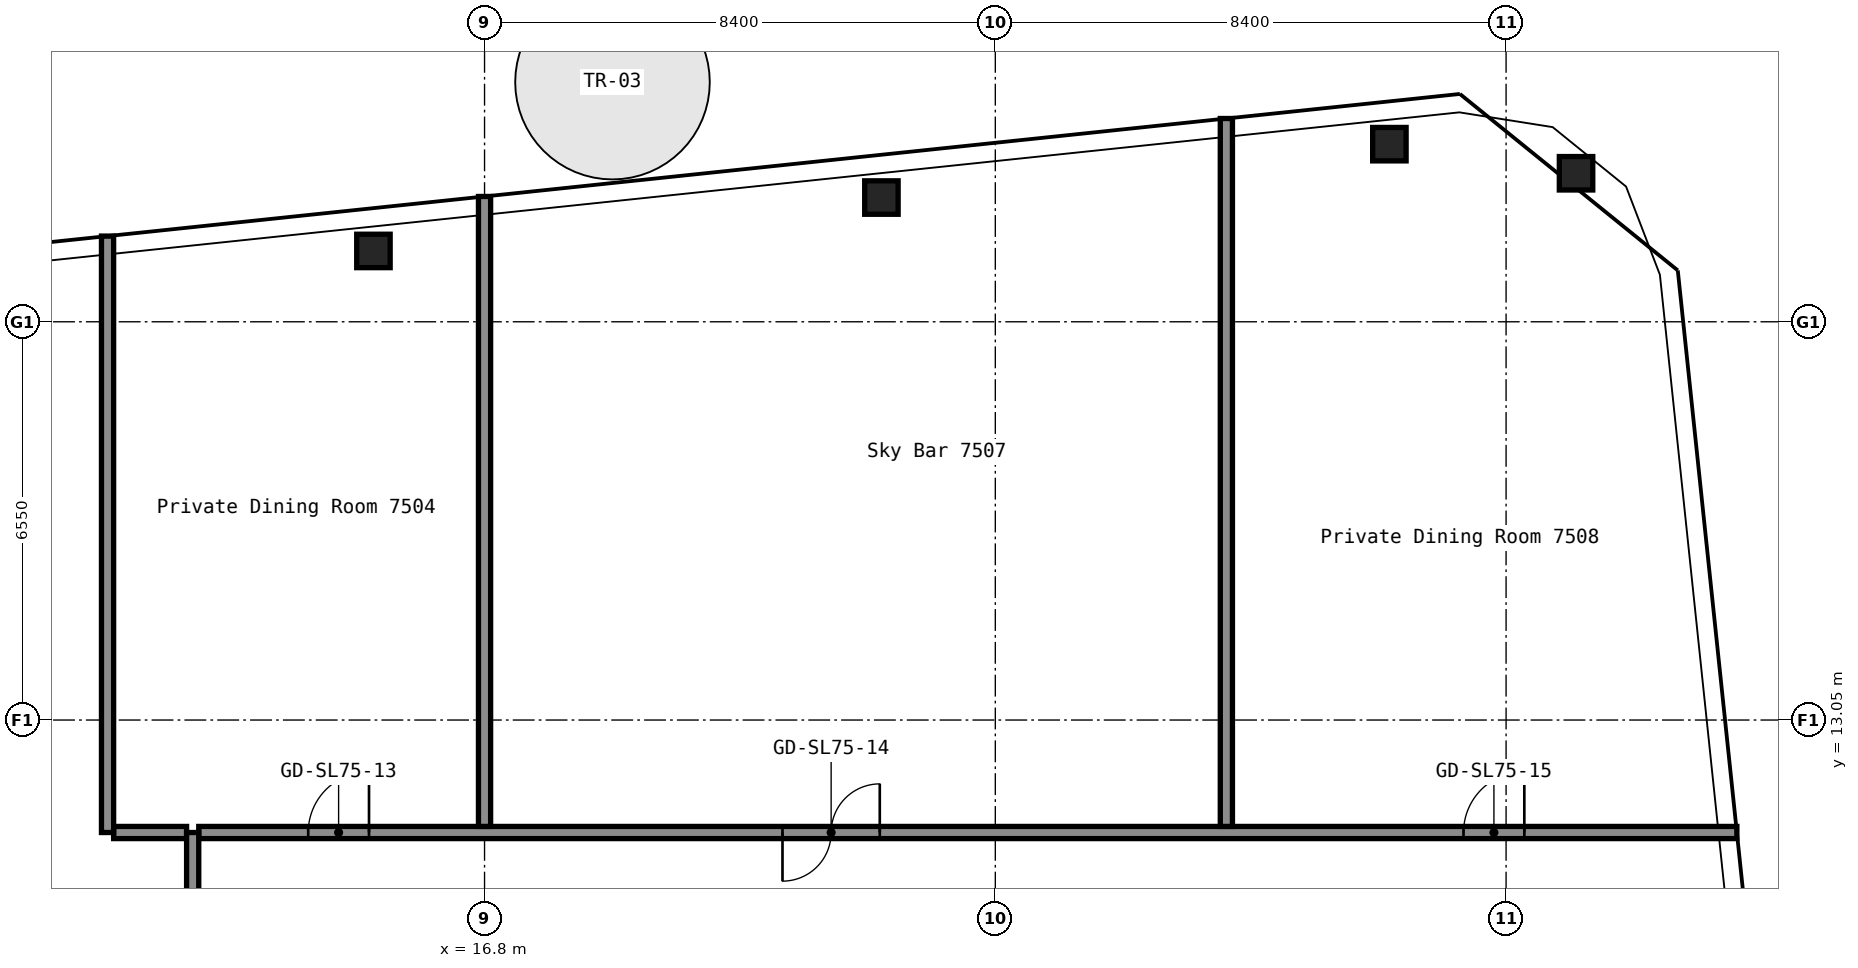
"""IFC4 building model, lengths in metres.
Left out: names, types, materials, properties, quantities, classifications, styles, units other than length and angle.
Written with IfcOpenShell. Run it as: python <this file> out.ifc"""

import sys

from ifc_helpers import new_model, si_unit, direction, frame, frame_2d, origin, origin_2d, place, context, subcontext, project, spatial, rectangle, hollow_rectangle, extrude, element, fill, save


model = new_model("IFC4")
c1 = context("Model", 3, precision=1e-05, world=origin(), true_north=direction((0.0, 1.0)))
c2 = subcontext(c1, "Body", "Model", "MODEL_VIEW")
j1 = project(units=[si_unit("LENGTHUNIT", "METRE"), si_unit("PLANEANGLEUNIT", "RADIAN")], contexts=[c1])
p1 = place(None, origin())
s1 = spatial("IfcSite", under=j1, at=p1, CompositionType="ELEMENT")
p2 = place(p1, origin())
s2 = spatial("IfcBuilding", under=s1, at=p2, CompositionType="ELEMENT")
p3 = place(p2, frame((0.0, 0.0, 264.6)))
s3 = spatial("IfcBuildingStorey", under=s2, at=p3, CompositionType="ELEMENT", Elevation=264.6)
for number, where, z_axis, x_axis in (
    (1, (14.973, 20.765, 0.0), (0.0, 0.0, 1.0), (1.0, 0.0, 0.0)),
    (2, (23.327, 21.643, 0.0), (0.0, 0.0, 1.0), (1.0, 0.0, 0.0)),
    (3, (31.681, 22.521, 0.0), (0.0, 0.0, 1.0), (1.0, 0.0, 0.0)),
    (4, (34.751, 22.042, 0.0), (0.0, 0.0, 1.0), (1.0, 0.0, 0.0)),
):
    element("IfcColumn", number, at=place(p3, frame(where, z_axis=z_axis, x_axis=x_axis)), inside=s3, PredefinedType="COLUMN", context=c2, shape_type="SweptSolid", body=[
        extrude(hollow_rectangle(XDim=0.55, YDim=0.55, WallThickness=0.022, InnerFilletRadius=0.033, OuterFilletRadius=0.055, at=origin_2d()), origin(), (0.0, 0.0, 1.0), 5.55),
    ])
p4 = place(p3, frame((10.7, 11.2, 0.0), z_axis=(0.0, 0.0, 1.0), x_axis=(1.0, 0.0, 0.0)))
e5 = element("IfcWall", 5, at=p4, inside=s3, PredefinedType="PARTITIONING", context=c2, shape_type="SweptSolid", body=[
    extrude(rectangle(XDim=1.2, YDim=0.2, at=frame_2d((0.6, 0.0))), origin(), (0.0, 0.0, 1.0), 5.55),
])
p5 = place(p3, frame((12.1, 11.2, 0.0), z_axis=(0.0, 0.0, 1.0), x_axis=(1.0, 0.0, 0.0)))
e6 = element("IfcWall", 6, at=p5, inside=s3, PredefinedType="PARTITIONING", context=c2, shape_type="SweptSolid", body=[
    extrude(rectangle(XDim=25.295, YDim=0.2, at=frame_2d((12.648, 0.0))), origin(), (0.0, 0.0, 1.0), 5.55),
])
p6 = place(p5, frame((1.8, 0.0, 0.0)))
e7 = element("IfcOpeningElement", 7, at=p6, cuts=e6, PredefinedType="OPENING", context=c2, shape_type="SweptSolid", body=[
    extrude(rectangle(XDim=1.0, YDim=2.1, at=frame_2d((0.5, 1.05))), frame((0.0, 0.11, 0.0), z_axis=(0.0, -1.0, 0.0), x_axis=(1.0, 0.0, 0.0)), (0.0, 0.0, 1.0), 0.22),
])
p7 = place(p5, frame((9.6, 0.0, 0.0)))
e8 = element("IfcOpeningElement", 8, at=p7, cuts=e6, PredefinedType="OPENING", context=c2, shape_type="SweptSolid", body=[
    extrude(rectangle(XDim=1.6, YDim=2.1, at=frame_2d((0.8, 1.05))), frame((0.0, 0.11, 0.0), z_axis=(0.0, -1.0, 0.0), x_axis=(1.0, 0.0, 0.0)), (0.0, 0.0, 1.0), 0.22),
])
p8 = place(p5, frame((20.8, 0.0, 0.0)))
e9 = element("IfcOpeningElement", 9, at=p8, cuts=e6, PredefinedType="OPENING", context=c2, shape_type="SweptSolid", body=[
    extrude(rectangle(XDim=1.0, YDim=2.1, at=frame_2d((0.5, 1.05))), frame((0.0, 0.11, 0.0), z_axis=(0.0, -1.0, 0.0), x_axis=(1.0, 0.0, 0.0)), (0.0, 0.0, 1.0), 0.22),
])
p9 = place(p3, frame((10.6, 11.2, 0.0), z_axis=(0.0, 0.0, 1.0), x_axis=(0.0, 1.0, 0.0)))
e10 = element("IfcWall", 10, at=p9, inside=s3, PredefinedType="PARTITIONING", context=c2, shape_type="SweptSolid", body=[
    extrude(rectangle(XDim=9.81, YDim=0.2, at=frame_2d((4.905, 0.0))), origin(), (0.0, 0.0, 1.0), 5.55),
])
p10 = place(p3, frame((12.0, 2.4, 0.0), z_axis=(0.0, 0.0, 1.0), x_axis=(0.0, 1.0, 0.0)))
e11 = element("IfcWall", 11, at=p10, inside=s3, PredefinedType="PARTITIONING", context=c2, shape_type="SweptSolid", body=[
    extrude(rectangle(XDim=8.8, YDim=0.2, at=frame_2d((4.4, 0.0))), origin(), (0.0, 0.0, 1.0), 5.55),
])
p11 = place(p10, frame((4.15, 0.0, 0.0)))
e12 = element("IfcOpeningElement", 12, at=p11, cuts=e11, PredefinedType="OPENING", context=c2, shape_type="SweptSolid", body=[
    extrude(rectangle(XDim=0.9, YDim=2.1, at=frame_2d((0.45, 1.05))), frame((0.0, 0.11, 0.0), z_axis=(0.0, -1.0, 0.0), x_axis=(1.0, 0.0, 0.0)), (0.0, 0.0, 1.0), 0.22),
])
p12 = place(p3, frame((16.8, 11.3, 0.0), z_axis=(0.0, 0.0, 1.0), x_axis=(0.0, 1.0, 0.0)))
e13 = element("IfcWall", 13, at=p12, inside=s3, PredefinedType="PARTITIONING", context=c2, shape_type="SweptSolid", body=[
    extrude(rectangle(XDim=10.361, YDim=0.2, at=frame_2d((5.18, 0.0))), origin(), (0.0, 0.0, 1.0), 5.55),
])
p13 = place(p3, frame((29.0, 11.3, 0.0), z_axis=(0.0, 0.0, 1.0), x_axis=(0.0, 1.0, 0.0)))
e14 = element("IfcWall", 14, at=p13, inside=s3, PredefinedType="PARTITIONING", context=c2, shape_type="SweptSolid", body=[
    extrude(rectangle(XDim=11.643, YDim=0.2, at=frame_2d((5.822, 0.0))), origin(), (0.0, 0.0, 1.0), 5.55),
])
p14 = place(p6, origin())
e15 = element("IfcDoor", 15, at=p14, inside=s3, OperationType="SINGLE_SWING_LEFT", PredefinedType="DOOR", context=c2, shape_type="SweptSolid", body=[
    extrude(rectangle(XDim=1.0, YDim=2.1, at=frame_2d((0.5, 1.05))), frame((0.0, 0.025, 0.0), z_axis=(0.0, -1.0, 0.0), x_axis=(1.0, 0.0, 0.0)), (0.0, 0.0, 1.0), 0.05),
])
fill(e7, e15)
p15 = place(p7, origin())
e16 = element("IfcDoor", 16, at=p15, inside=s3, OperationType="DOUBLE_DOOR_SINGLE_SWING", PredefinedType="DOOR", context=c2, shape_type="SweptSolid", body=[
    extrude(rectangle(XDim=1.6, YDim=2.1, at=frame_2d((0.8, 1.05))), frame((0.0, 0.025, 0.0), z_axis=(0.0, -1.0, 0.0), x_axis=(1.0, 0.0, 0.0)), (0.0, 0.0, 1.0), 0.05),
])
fill(e8, e16)
p16 = place(p8, origin())
e17 = element("IfcDoor", 17, at=p16, inside=s3, OperationType="SINGLE_SWING_LEFT", PredefinedType="DOOR", context=c2, shape_type="SweptSolid", body=[
    extrude(rectangle(XDim=1.0, YDim=2.1, at=frame_2d((0.5, 1.05))), frame((0.0, 0.025, 0.0), z_axis=(0.0, -1.0, 0.0), x_axis=(1.0, 0.0, 0.0)), (0.0, 0.0, 1.0), 0.05),
])
fill(e9, e17)
save(model, sys.argv[1])
